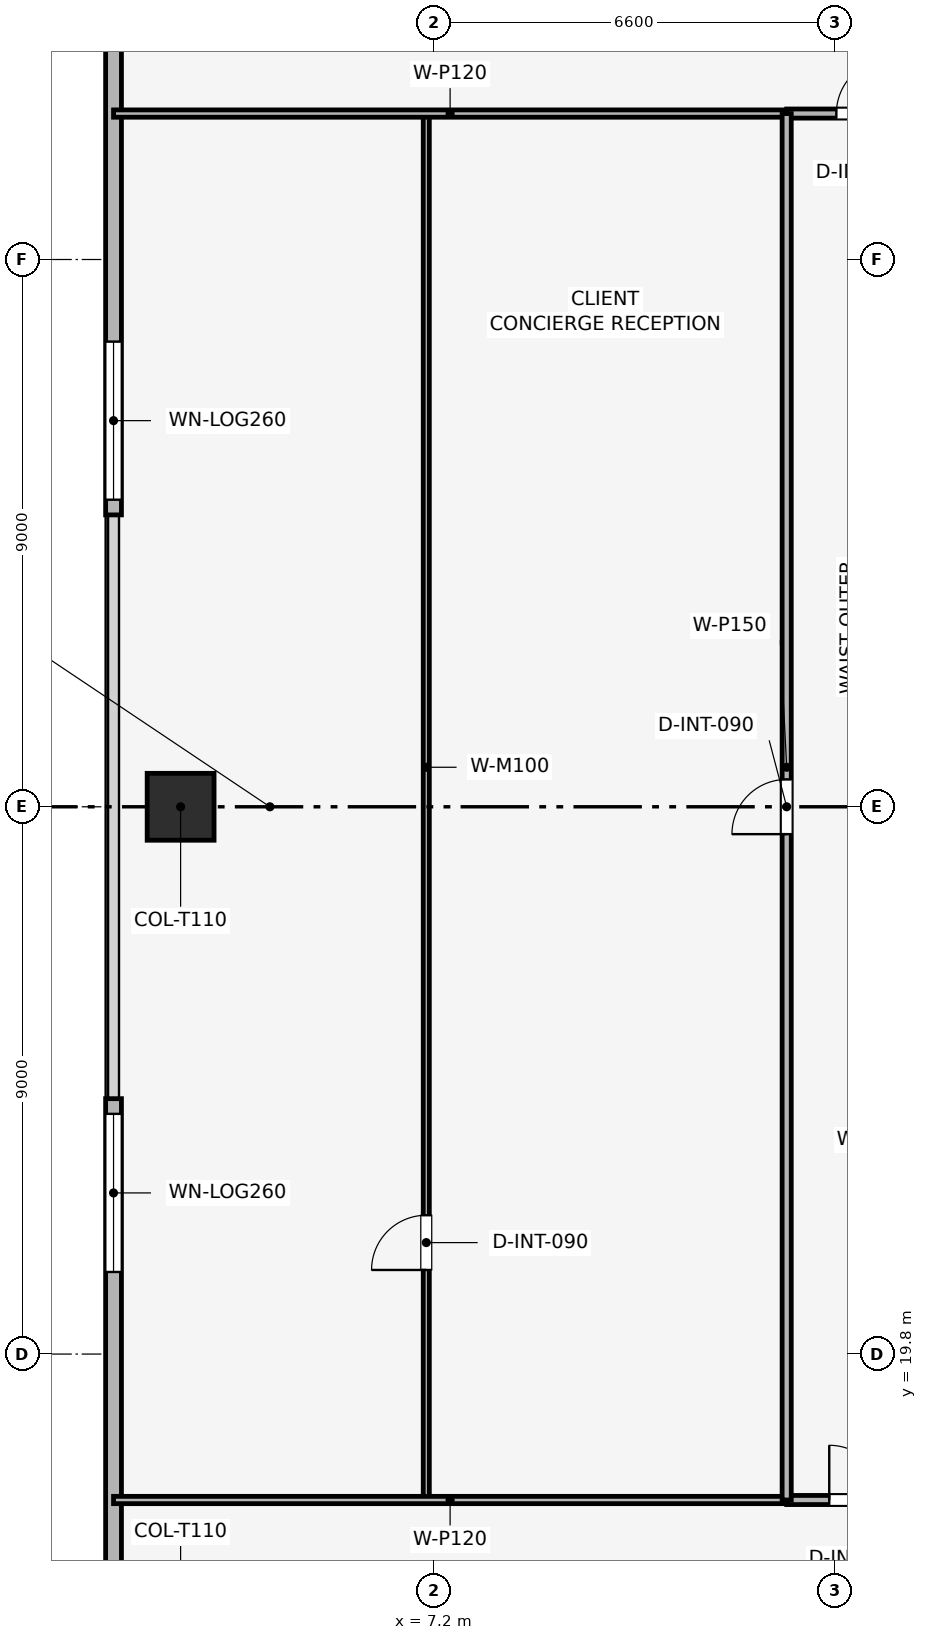
"""IFC4 building model, lengths in metres.
Left out: names, types, materials, properties, quantities, classifications, styles, units other than length and angle.
Written with IfcOpenShell. Run it as: python <this file> out.ifc"""

import sys

from ifc_helpers import new_model, si_unit, direction, frame, frame_2d, origin, origin_2d, place, context, subcontext, project, spatial, rectangle, extrude, element, fill, save


model = new_model("IFC4")
c1 = context("Model", 3, precision=1e-05, world=origin(), true_north=direction((0.0, 1.0)))
c2 = subcontext(c1, "Body", "Model", "MODEL_VIEW")
j1 = project(units=[si_unit("LENGTHUNIT", "METRE"), si_unit("PLANEANGLEUNIT", "RADIAN")], contexts=[c1])
p1 = place(None, origin())
s1 = spatial("IfcSite", under=j1, at=p1, CompositionType="ELEMENT")
p2 = place(p1, origin())
s2 = spatial("IfcBuilding", under=s1, at=p2, CompositionType="ELEMENT")
p3 = place(p2, frame((0.0, 0.0, 241.2)))
s3 = spatial("IfcBuildingStorey", under=s2, at=p3, CompositionType="ELEMENT", Elevation=241.2)
p4 = place(p3, frame((3.033, 28.8, 0.084), z_axis=(0.362373598567, 0.0, 0.932032925954), x_axis=(0.0, 1.0, 0.0)))
e1 = element("IfcColumn", 1, at=p4, inside=s3, PredefinedType="COLUMN", context=c2, shape_type="SweptSolid", body=[
    extrude(rectangle(XDim=1.1, YDim=1.1, at=origin_2d()), origin(), (0.0, 0.0, 1.0), 5.351),
])
p5 = place(p3, frame((1.93, 9.3, 0.0), z_axis=(0.0, 0.0, 1.0), x_axis=(0.0, 1.0, 0.0)))
e2 = element("IfcWall", 2, at=p5, inside=s3, PredefinedType="SOLIDWALL", context=c2, shape_type="SweptSolid", body=[
    extrude(rectangle(XDim=14.7, YDim=0.26, at=frame_2d((7.35, 0.0))), origin(), (0.0, 0.0, 1.0), 5.15),
])
p6 = place(p5, frame((11.85, 0.0, 0.9)))
e3 = element("IfcOpeningElement", 3, at=p6, cuts=e2, PredefinedType="OPENING", context=c2, shape_type="SweptSolid", body=[
    extrude(rectangle(XDim=2.6, YDim=2.2, at=frame_2d((1.3, 1.1))), frame((0.0, 0.14, 0.0), z_axis=(0.0, -1.0, 0.0), x_axis=(1.0, 0.0, 0.0)), (0.0, 0.0, 1.0), 0.28),
])
p7 = place(p3, frame((1.93, 33.6, 0.0), z_axis=(0.0, 0.0, 1.0), x_axis=(0.0, 1.0, 0.0)))
e4 = element("IfcWall", 4, at=p7, inside=s3, PredefinedType="SOLIDWALL", context=c2, shape_type="SweptSolid", body=[
    extrude(rectangle(XDim=14.7, YDim=0.26, at=frame_2d((7.35, 0.0))), origin(), (0.0, 0.0, 1.0), 5.15),
])
p8 = place(p7, frame((0.25, 0.0, 0.9)))
e5 = element("IfcOpeningElement", 5, at=p8, cuts=e4, PredefinedType="OPENING", context=c2, shape_type="SweptSolid", body=[
    extrude(rectangle(XDim=2.6, YDim=2.2, at=frame_2d((1.3, 1.1))), frame((0.0, 0.14, 0.0), z_axis=(0.0, -1.0, 0.0), x_axis=(1.0, 0.0, 0.0)), (0.0, 0.0, 1.0), 0.28),
])
p9 = place(p3, frame((7.073, 17.4, 0.0), z_axis=(0.0, 0.0, 1.0), x_axis=(0.0, 1.0, 0.0)))
e6 = element("IfcWall", 6, at=p9, inside=s3, PredefinedType="MOVABLE", context=c2, shape_type="SweptSolid", body=[
    extrude(rectangle(XDim=22.8, YDim=0.1, at=frame_2d((11.4, 0.0))), origin(), (0.0, 0.0, 1.0), 4.735),
])
p10 = place(p9, frame((3.783, 0.0, 0.0)))
e7 = element("IfcOpeningElement", 7, at=p10, cuts=e6, PredefinedType="OPENING", context=c2, shape_type="SweptSolid", body=[
    extrude(rectangle(XDim=0.9, YDim=2.1, at=frame_2d((0.45, 1.05))), frame((0.0, 0.06, 0.0), z_axis=(0.0, -1.0, 0.0), x_axis=(1.0, 0.0, 0.0)), (0.0, 0.0, 1.0), 0.12),
])
for number, where, z_axis, x_axis in (
    (8, (1.93, 17.4, 0.0), (0.0, 0.0, 1.0), (1.0, 0.0, 0.0)),
    (9, (1.93, 40.2, 0.0), (0.0, 0.0, 1.0), (1.0, 0.0, 0.0)),
):
    element("IfcWall", number, at=place(p3, frame(where, z_axis=z_axis, x_axis=x_axis)), inside=s3, PredefinedType="PARTITIONING", context=c2, shape_type="SweptSolid", body=[
        extrude(rectangle(XDim=11.07, YDim=0.12, at=frame_2d((5.535, 0.0))), origin(), (0.0, 0.0, 1.0), 4.735),
    ])
p11 = place(p3, frame((13.0, 17.4, 0.0), z_axis=(0.0, 0.0, 1.0), x_axis=(1.0, 0.0, 0.0)))
e10 = element("IfcWall", 10, at=p11, inside=s3, PredefinedType="PARTITIONING", context=c2, shape_type="SweptSolid", body=[
    extrude(rectangle(XDim=31.6, YDim=0.15, at=frame_2d((15.8, 0.0))), origin(), (0.0, 0.0, 1.0), 4.735),
])
p12 = place(p11, frame((0.7, 0.0, 0.0)))
e11 = element("IfcOpeningElement", 11, at=p12, cuts=e10, PredefinedType="OPENING", context=c2, shape_type="SweptSolid", body=[
    extrude(rectangle(XDim=0.9, YDim=2.1, at=frame_2d((0.45, 1.05))), frame((0.0, 0.085, 0.0), z_axis=(0.0, -1.0, 0.0), x_axis=(1.0, 0.0, 0.0)), (0.0, 0.0, 1.0), 0.17),
])
p13 = place(p11, frame((8.483, 0.0, 0.0)))
e12 = element("IfcOpeningElement", 12, at=p13, cuts=e10, PredefinedType="OPENING", context=c2, shape_type="SweptSolid", body=[
    extrude(rectangle(XDim=0.9, YDim=2.1, at=frame_2d((0.45, 1.05))), frame((0.0, 0.085, 0.0), z_axis=(0.0, -1.0, 0.0), x_axis=(1.0, 0.0, 0.0)), (0.0, 0.0, 1.0), 0.17),
])
p14 = place(p11, frame((23.133, 0.0, 0.0)))
e13 = element("IfcOpeningElement", 13, at=p14, cuts=e10, PredefinedType="OPENING", context=c2, shape_type="SweptSolid", body=[
    extrude(rectangle(XDim=0.9, YDim=2.1, at=frame_2d((0.45, 1.05))), frame((0.0, 0.085, 0.0), z_axis=(0.0, -1.0, 0.0), x_axis=(1.0, 0.0, 0.0)), (0.0, 0.0, 1.0), 0.17),
])
p15 = place(p3, frame((13.0, 40.2, 0.0), z_axis=(0.0, 0.0, 1.0), x_axis=(1.0, 0.0, 0.0)))
e14 = element("IfcWall", 14, at=p15, inside=s3, PredefinedType="PARTITIONING", context=c2, shape_type="SweptSolid", body=[
    extrude(rectangle(XDim=31.6, YDim=0.15, at=frame_2d((15.8, 0.0))), origin(), (0.0, 0.0, 1.0), 4.735),
])
p16 = place(p15, frame((0.817, 0.0, 0.0)))
e15 = element("IfcOpeningElement", 15, at=p16, cuts=e14, PredefinedType="OPENING", context=c2, shape_type="SweptSolid", body=[
    extrude(rectangle(XDim=0.9, YDim=2.1, at=frame_2d((0.45, 1.05))), frame((0.0, 0.085, 0.0), z_axis=(0.0, -1.0, 0.0), x_axis=(1.0, 0.0, 0.0)), (0.0, 0.0, 1.0), 0.17),
])
p17 = place(p15, frame((8.75, 0.0, 0.0)))
e16 = element("IfcOpeningElement", 16, at=p17, cuts=e14, PredefinedType="OPENING", context=c2, shape_type="SweptSolid", body=[
    extrude(rectangle(XDim=0.9, YDim=2.1, at=frame_2d((0.45, 1.05))), frame((0.0, 0.085, 0.0), z_axis=(0.0, -1.0, 0.0), x_axis=(1.0, 0.0, 0.0)), (0.0, 0.0, 1.0), 0.17),
])
p18 = place(p15, frame((23.282, 0.0, 0.0)))
e17 = element("IfcOpeningElement", 17, at=p18, cuts=e14, PredefinedType="OPENING", context=c2, shape_type="SweptSolid", body=[
    extrude(rectangle(XDim=0.9, YDim=2.1, at=frame_2d((0.45, 1.05))), frame((0.0, 0.085, 0.0), z_axis=(0.0, -1.0, 0.0), x_axis=(1.0, 0.0, 0.0)), (0.0, 0.0, 1.0), 0.17),
])
p19 = place(p3, frame((13.0, 17.4, 0.0), z_axis=(0.0, 0.0, 1.0), x_axis=(0.0, 1.0, 0.0)))
e18 = element("IfcWall", 18, at=p19, inside=s3, PredefinedType="PARTITIONING", context=c2, shape_type="SweptSolid", body=[
    extrude(rectangle(XDim=22.8, YDim=0.15, at=frame_2d((11.4, 0.0))), origin(), (0.0, 0.0, 1.0), 4.735),
])
p20 = place(p19, frame((10.95, 0.0, 0.0)))
e19 = element("IfcOpeningElement", 19, at=p20, cuts=e18, PredefinedType="OPENING", context=c2, shape_type="SweptSolid", body=[
    extrude(rectangle(XDim=0.9, YDim=2.1, at=frame_2d((0.45, 1.05))), frame((0.0, 0.085, 0.0), z_axis=(0.0, -1.0, 0.0), x_axis=(1.0, 0.0, 0.0)), (0.0, 0.0, 1.0), 0.17),
])
p21 = place(p6, origin())
e20 = element("IfcWindow", 20, at=p21, inside=s3, PartitioningType="SINGLE_PANEL", PredefinedType="WINDOW", context=c2, shape_type="SweptSolid", body=[
    extrude(rectangle(XDim=2.6, YDim=2.2, at=frame_2d((1.3, 1.1))), frame((0.0, 0.03, 0.0), z_axis=(0.0, -1.0, 0.0), x_axis=(1.0, 0.0, 0.0)), (0.0, 0.0, 1.0), 0.06),
])
fill(e3, e20)
p22 = place(p8, origin())
e21 = element("IfcWindow", 21, at=p22, inside=s3, PartitioningType="SINGLE_PANEL", PredefinedType="WINDOW", context=c2, shape_type="SweptSolid", body=[
    extrude(rectangle(XDim=2.6, YDim=2.2, at=frame_2d((1.3, 1.1))), frame((0.0, 0.03, 0.0), z_axis=(0.0, -1.0, 0.0), x_axis=(1.0, 0.0, 0.0)), (0.0, 0.0, 1.0), 0.06),
])
fill(e5, e21)
p23 = place(p10, origin())
e22 = element("IfcDoor", 22, at=p23, inside=s3, OperationType="SINGLE_SWING_LEFT", PredefinedType="DOOR", context=c2, shape_type="SweptSolid", body=[
    extrude(rectangle(XDim=0.9, YDim=2.1, at=frame_2d((0.45, 1.05))), frame((0.0, 0.025, 0.0), z_axis=(0.0, -1.0, 0.0), x_axis=(1.0, 0.0, 0.0)), (0.0, 0.0, 1.0), 0.05),
])
fill(e7, e22)
p24 = place(p12, origin())
e23 = element("IfcDoor", 23, at=p24, inside=s3, OperationType="SINGLE_SWING_LEFT", PredefinedType="DOOR", context=c2, shape_type="SweptSolid", body=[
    extrude(rectangle(XDim=0.9, YDim=2.1, at=frame_2d((0.45, 1.05))), frame((0.0, 0.025, 0.0), z_axis=(0.0, -1.0, 0.0), x_axis=(1.0, 0.0, 0.0)), (0.0, 0.0, 1.0), 0.05),
])
fill(e11, e23)
p25 = place(p16, origin())
e24 = element("IfcDoor", 24, at=p25, inside=s3, OperationType="SINGLE_SWING_RIGHT", PredefinedType="DOOR", context=c2, shape_type="SweptSolid", body=[
    extrude(rectangle(XDim=0.9, YDim=2.1, at=frame_2d((0.45, 1.05))), frame((0.0, 0.025, 0.0), z_axis=(0.0, -1.0, 0.0), x_axis=(1.0, 0.0, 0.0)), (0.0, 0.0, 1.0), 0.05),
])
fill(e15, e24)
p26 = place(p20, origin())
e25 = element("IfcDoor", 25, at=p26, inside=s3, OperationType="SINGLE_SWING_LEFT", PredefinedType="DOOR", context=c2, shape_type="SweptSolid", body=[
    extrude(rectangle(XDim=0.9, YDim=2.1, at=frame_2d((0.45, 1.05))), frame((0.0, 0.025, 0.0), z_axis=(0.0, -1.0, 0.0), x_axis=(1.0, 0.0, 0.0)), (0.0, 0.0, 1.0), 0.05),
])
fill(e19, e25)
save(model, sys.argv[1])
